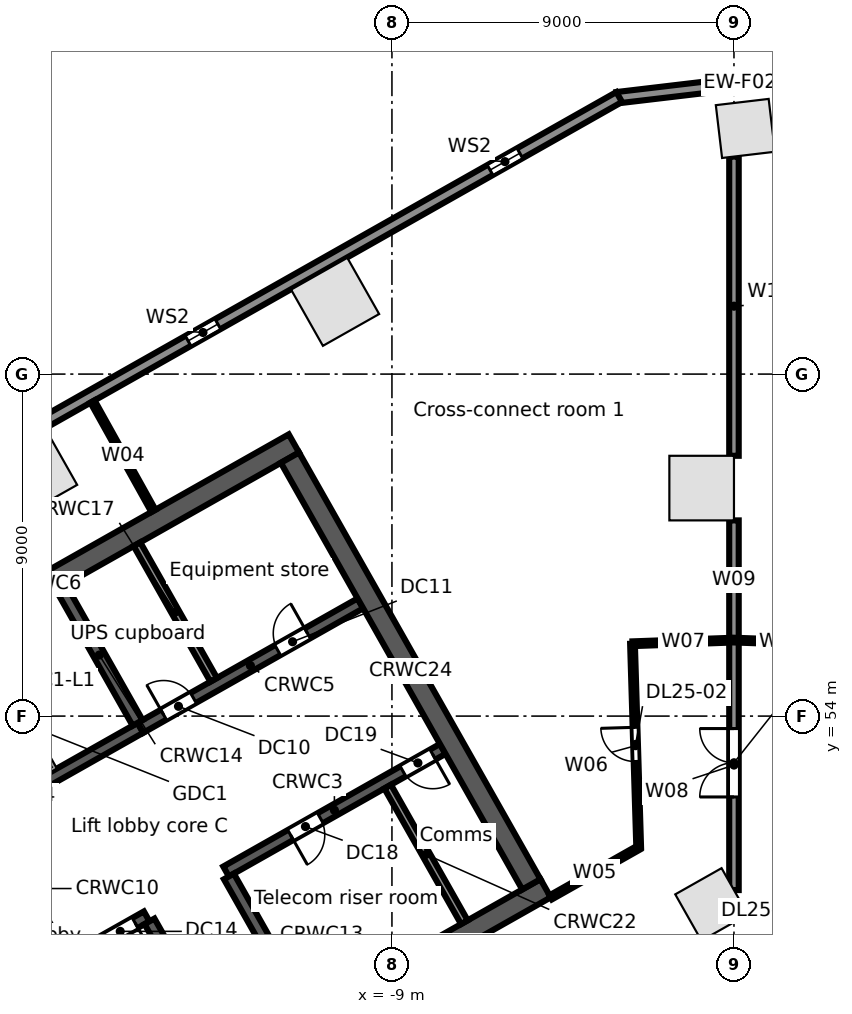
"""IFC4 building model, lengths in metres.
Left out: names, types, materials, properties, quantities, classifications, styles, units other than length and angle.
Written with IfcOpenShell. Run it as: python <this file> out.ifc"""

import sys

from ifc_helpers import new_model, si_unit, direction, frame, frame_2d, origin, origin_2d, place, context, subcontext, project, spatial, rectangle, extrude, element, fill, save


model = new_model("IFC4")
c1 = context("Model", 3, precision=1e-05, world=origin(), true_north=direction((0.0, 1.0)))
c2 = subcontext(c1, "Body", "Model", "MODEL_VIEW")
j1 = project(units=[si_unit("LENGTHUNIT", "METRE"), si_unit("PLANEANGLEUNIT", "RADIAN")], contexts=[c1])
p1 = place(None, origin())
s1 = spatial("IfcSite", under=j1, at=p1, CompositionType="ELEMENT")
p2 = place(p1, origin())
s2 = spatial("IfcBuilding", under=s1, at=p2, CompositionType="ELEMENT")
p3 = place(p2, frame((0.0, 0.0, 123.5)))
s3 = spatial("IfcBuildingStorey", under=s2, at=p3, CompositionType="ELEMENT", Elevation=123.5)
p4 = place(p3, frame((0.3, 69.464, 0.0), z_axis=(0.0, 0.0, 1.0), x_axis=(-0.993068456955, -0.117537397458, 0.0)))
e1 = element("IfcColumn", 1, at=p4, inside=s3, PredefinedType="COLUMN", context=c2, shape_type="SweptSolid", body=[
    extrude(rectangle(XDim=1.4, YDim=1.4, at=origin_2d()), origin(), (0.0, 0.0, 1.0), 4.4),
])
for number, where, z_axis, x_axis in (
    (2, (-10.495, 64.902, 0.0), (0.0, 0.0, 1.0), (-0.87, -0.492, 0.0)),
    (3, (-18.441, 60.406, 0.0), (0.0, 0.0, 1.0), (-0.87, -0.492, 0.0)),
):
    element("IfcColumn", number, at=place(p3, frame(where, z_axis=z_axis, x_axis=x_axis)), inside=s3, PredefinedType="COLUMN", context=c2, shape_type="SweptSolid", body=[
        extrude(rectangle(XDim=1.7, YDim=1.7, at=origin_2d()), origin(), (0.0, 0.0, 1.0), 4.4),
    ])
p5 = place(p3, frame((-0.591, 49.044, 0.0), z_axis=(0.0, 0.0, 1.0), x_axis=(0.87035569594, 0.492423560103, 0.0)))
e4 = element("IfcColumn", 4, at=p5, inside=s3, PredefinedType="COLUMN", context=c2, shape_type="SweptSolid", body=[
    extrude(rectangle(XDim=1.4, YDim=1.4, at=origin_2d()), origin(), (0.0, 0.0, 1.0), 4.4),
])
p6 = place(p3, frame((-0.85, 60.0, 0.0), z_axis=(0.0, 0.0, 1.0), x_axis=(0.0, 1.0, 0.0)))
e5 = element("IfcColumn", 5, at=p6, inside=s3, PredefinedType="COLUMN", context=c2, shape_type="SweptSolid", body=[
    extrude(rectangle(XDim=1.7, YDim=1.7, at=origin_2d()), origin(), (0.0, 0.0, 1.0), 4.4),
])
p7 = place(p3, frame((-3.076, 70.273, 0.0), z_axis=(0.0, 0.0, 1.0), x_axis=(0.993067743007, 0.117543429416, 0.0)))
e6 = element("IfcWall", 6, at=p7, inside=s3, PredefinedType="STANDARD", context=c2, shape_type="SweptSolid", body=[
    extrude(rectangle(XDim=6.516, YDim=0.3, at=frame_2d((3.258, 0.0))), origin(), (0.0, 0.0, 1.0), 4.08),
])
p8 = place(p3, frame((-58.745, 38.764, 0.0), z_axis=(0.0, 0.0, 1.0), x_axis=(0.870355811726, 0.492423355453, 0.0)))
e7 = element("IfcWall", 7, at=p8, inside=s3, PredefinedType="STANDARD", context=c2, shape_type="SweptSolid", body=[
    extrude(rectangle(XDim=64.025, YDim=0.3, at=frame_2d((32.013, 0.0))), origin(), (0.0, 0.0, 1.0), 4.08),
])
p9 = place(p8, frame((60.122, 0.0, 0.6)))
e8 = element("IfcOpeningElement", 8, at=p9, cuts=e7, PredefinedType="OPENING", context=c2, shape_type="SweptSolid", body=[
    extrude(rectangle(XDim=0.9, YDim=2.8, at=frame_2d((0.45, 1.4))), frame((0.0, 0.16, 0.0), z_axis=(0.0, -1.0, 0.0), x_axis=(1.0, 0.0, 0.0)), (0.0, 0.0, 1.0), 0.32),
])
p10 = place(p8, frame((50.992, 0.0, 0.6)))
e9 = element("IfcOpeningElement", 9, at=p10, cuts=e7, PredefinedType="OPENING", context=c2, shape_type="SweptSolid", body=[
    extrude(rectangle(XDim=0.9, YDim=2.8, at=frame_2d((0.45, 1.4))), frame((0.0, 0.16, 0.0), z_axis=(0.0, -1.0, 0.0), x_axis=(1.0, 0.0, 0.0)), (0.0, 0.0, 1.0), 0.32),
])
p11 = place(p8, frame((41.862, 0.0, 0.6)))
e10 = element("IfcOpeningElement", 10, at=p11, cuts=e7, PredefinedType="OPENING", context=c2, shape_type="SweptSolid", body=[
    extrude(rectangle(XDim=0.9, YDim=2.8, at=frame_2d((0.45, 1.4))), frame((0.0, 0.16, 0.0), z_axis=(0.0, -1.0, 0.0), x_axis=(1.0, 0.0, 0.0)), (0.0, 0.0, 1.0), 0.32),
])
p12 = place(p8, frame((32.732, 0.0, 0.6)))
e11 = element("IfcOpeningElement", 11, at=p12, cuts=e7, PredefinedType="OPENING", context=c2, shape_type="SweptSolid", body=[
    extrude(rectangle(XDim=0.9, YDim=2.8, at=frame_2d((0.45, 1.4))), frame((0.0, 0.16, 0.0), z_axis=(0.0, -1.0, 0.0), x_axis=(1.0, 0.0, 0.0)), (0.0, 0.0, 1.0), 0.32),
])
p13 = place(p8, frame((23.602, 0.0, 0.6)))
e12 = element("IfcOpeningElement", 12, at=p13, cuts=e7, PredefinedType="OPENING", context=c2, shape_type="SweptSolid", body=[
    extrude(rectangle(XDim=0.9, YDim=2.8, at=frame_2d((0.45, 1.4))), frame((0.0, 0.16, 0.0), z_axis=(0.0, -1.0, 0.0), x_axis=(1.0, 0.0, 0.0)), (0.0, 0.0, 1.0), 0.32),
])
p14 = place(p8, frame((14.472, 0.0, 0.6)))
e13 = element("IfcOpeningElement", 13, at=p14, cuts=e7, PredefinedType="OPENING", context=c2, shape_type="SweptSolid", body=[
    extrude(rectangle(XDim=0.9, YDim=2.8, at=frame_2d((0.45, 1.4))), frame((0.0, 0.16, 0.0), z_axis=(0.0, -1.0, 0.0), x_axis=(1.0, 0.0, 0.0)), (0.0, 0.0, 1.0), 0.32),
])
p15 = place(p8, frame((5.342, 0.0, 0.6)))
e14 = element("IfcOpeningElement", 14, at=p15, cuts=e7, PredefinedType="OPENING", context=c2, shape_type="SweptSolid", body=[
    extrude(rectangle(XDim=0.9, YDim=2.8, at=frame_2d((0.45, 1.4))), frame((0.0, 0.16, 0.0), z_axis=(0.0, -1.0, 0.0), x_axis=(1.0, 0.0, 0.0)), (0.0, 0.0, 1.0), 0.32),
])
p16 = place(p3, frame((-18.012, 42.083, 0.0), z_axis=(0.0, 0.0, 1.0), x_axis=(0.870360574057, 0.492414937962, 0.0)))
e15 = element("IfcWall", 15, at=p16, inside=s3, PredefinedType="SOLIDWALL", context=c2, shape_type="SweptSolid", body=[
    extrude(rectangle(XDim=15.0, YDim=0.55, at=frame_2d((7.5, 0.0))), origin(), (0.0, 0.0, 1.0), 4.08),
])
p17 = place(p16, frame((6.1, 0.0, 0.0)))
e16 = element("IfcOpeningElement", 16, at=p17, cuts=e15, PredefinedType="OPENING", context=c2, shape_type="SweptSolid", body=[
    extrude(rectangle(XDim=1.2, YDim=2.1, at=frame_2d((0.6, 1.05))), frame((0.0, 0.285, 0.0), z_axis=(0.0, -1.0, 0.0), x_axis=(1.0, 0.0, 0.0)), (0.0, 0.0, 1.0), 0.57),
])
p18 = place(p3, frame((-19.762, 46.292, 0.0), z_axis=(0.0, 0.0, 1.0), x_axis=(0.870359758983, 0.49241637863, 0.0)))
e17 = element("IfcWall", 17, at=p18, inside=s3, PredefinedType="SOLIDWALL", context=c2, shape_type="SweptSolid", body=[
    extrude(rectangle(XDim=4.95, YDim=0.3, at=frame_2d((2.475, 0.0))), origin(), (0.0, 0.0, 1.0), 4.08),
])
p19 = place(p18, frame((0.6, 0.0, 0.0)))
e18 = element("IfcOpeningElement", 18, at=p19, cuts=e17, PredefinedType="OPENING", context=c2, shape_type="SweptSolid", body=[
    extrude(rectangle(XDim=1.1, YDim=2.1, at=frame_2d((0.55, 1.05))), frame((0.0, 0.16, 0.0), z_axis=(0.0, -1.0, 0.0), x_axis=(1.0, 0.0, 0.0)), (0.0, 0.0, 1.0), 0.32),
])
p20 = place(p18, frame((3.7, 0.0, 0.0)))
e19 = element("IfcOpeningElement", 19, at=p20, cuts=e17, PredefinedType="OPENING", context=c2, shape_type="SweptSolid", body=[
    extrude(rectangle(XDim=0.9, YDim=2.1, at=frame_2d((0.45, 1.05))), frame((0.0, 0.16, 0.0), z_axis=(0.0, -1.0, 0.0), x_axis=(1.0, 0.0, 0.0)), (0.0, 0.0, 1.0), 0.32),
])
p21 = place(p3, frame((-13.365, 49.911, 0.0), z_axis=(0.0, 0.0, 1.0), x_axis=(0.870336435567, 0.492457601144, 0.0)))
e20 = element("IfcWall", 20, at=p21, inside=s3, PredefinedType="SOLIDWALL", context=c2, shape_type="SweptSolid", body=[
    extrude(rectangle(XDim=6.55, YDim=0.3, at=frame_2d((3.275, 0.0))), origin(), (0.0, 0.0, 1.0), 4.08),
])
p22 = place(p21, frame((1.95, 0.0, 0.0)))
e21 = element("IfcOpeningElement", 21, at=p22, cuts=e20, PredefinedType="OPENING", context=c2, shape_type="SweptSolid", body=[
    extrude(rectangle(XDim=0.9, YDim=2.1, at=frame_2d((0.45, 1.05))), frame((0.0, 0.16, 0.0), z_axis=(0.0, -1.0, 0.0), x_axis=(1.0, 0.0, 0.0)), (0.0, 0.0, 1.0), 0.32),
])
p23 = place(p21, frame((5.35, 0.0, 0.0)))
e22 = element("IfcOpeningElement", 22, at=p23, cuts=e20, PredefinedType="OPENING", context=c2, shape_type="SweptSolid", body=[
    extrude(rectangle(XDim=0.9, YDim=2.1, at=frame_2d((0.45, 1.05))), frame((0.0, 0.16, 0.0), z_axis=(0.0, -1.0, 0.0), x_axis=(1.0, 0.0, 0.0)), (0.0, 0.0, 1.0), 0.32),
])
p24 = place(p3, frame((-21.928, 50.121, 0.0), z_axis=(0.0, 0.0, 1.0), x_axis=(0.870340732628, 0.49245000673, 0.0)))
e23 = element("IfcWall", 23, at=p24, inside=s3, PredefinedType="SOLIDWALL", context=c2, shape_type="SweptSolid", body=[
    extrude(rectangle(XDim=7.25, YDim=0.3, at=frame_2d((3.625, 0.0))), origin(), (0.0, 0.0, 1.0), 4.08),
])
p25 = place(p24, frame((0.25, 0.0, 0.0)))
e24 = element("IfcOpeningElement", 24, at=p25, cuts=e23, PredefinedType="OPENING", context=c2, shape_type="SweptSolid", body=[
    extrude(rectangle(XDim=1.0, YDim=2.1, at=frame_2d((0.5, 1.05))), frame((0.0, 0.16, 0.0), z_axis=(0.0, -1.0, 0.0), x_axis=(1.0, 0.0, 0.0)), (0.0, 0.0, 1.0), 0.32),
])
p26 = place(p3, frame((-15.618, 53.691, 0.0), z_axis=(0.0, 0.0, 1.0), x_axis=(0.870367894134, 0.492401999246, 0.0)))
e25 = element("IfcWall", 25, at=p26, inside=s3, PredefinedType="SOLIDWALL", context=c2, shape_type="SweptSolid", body=[
    extrude(rectangle(XDim=6.65, YDim=0.3, at=frame_2d((3.325, 0.0))), origin(), (0.0, 0.0, 1.0), 4.08),
])
p27 = place(p26, frame((0.7, 0.0, 0.0)))
e26 = element("IfcOpeningElement", 26, at=p27, cuts=e25, PredefinedType="OPENING", context=c2, shape_type="SweptSolid", body=[
    extrude(rectangle(XDim=0.9, YDim=2.1, at=frame_2d((0.45, 1.05))), frame((0.0, 0.16, 0.0), z_axis=(0.0, -1.0, 0.0), x_axis=(1.0, 0.0, 0.0)), (0.0, 0.0, 1.0), 0.32),
])
p28 = place(p26, frame((4.15, 0.0, 0.0)))
e27 = element("IfcOpeningElement", 27, at=p28, cuts=e25, PredefinedType="OPENING", context=c2, shape_type="SweptSolid", body=[
    extrude(rectangle(XDim=0.9, YDim=2.1, at=frame_2d((0.45, 1.05))), frame((0.0, 0.16, 0.0), z_axis=(0.0, -1.0, 0.0), x_axis=(1.0, 0.0, 0.0)), (0.0, 0.0, 1.0), 0.32),
])
p29 = place(p3, frame((-24.635, 53.789, 0.0), z_axis=(0.0, 0.0, 1.0), x_axis=(0.870360574057, 0.492414937962, 0.0)))
e28 = element("IfcWall", 28, at=p29, inside=s3, PredefinedType="SOLIDWALL", context=c2, shape_type="SweptSolid", body=[
    extrude(rectangle(XDim=15.0, YDim=0.55, at=frame_2d((7.5, 0.0))), origin(), (0.0, 0.0, 1.0), 4.08),
])
p30 = place(p3, frame((-24.26, 53.685, 0.0), z_axis=(0.0, 0.0, 1.0), x_axis=(0.492427022044, -0.870353737259, 0.0)))
e29 = element("IfcWall", 29, at=p30, inside=s3, PredefinedType="SOLIDWALL", context=c2, shape_type="SweptSolid", body=[
    extrude(rectangle(XDim=12.9, YDim=0.55, at=frame_2d((6.45, 0.0))), origin(), (0.0, 0.0, 1.0), 4.08),
])
p31 = place(p3, frame((-19.635, 51.246, 0.0), z_axis=(0.0, 0.0, 1.0), x_axis=(0.492408451753, -0.87036424366, 0.0)))
e30 = element("IfcWall", 30, at=p31, inside=s3, PredefinedType="PARTITIONING", context=c2, shape_type="SweptSolid", body=[
    extrude(rectangle(XDim=4.1, YDim=0.2, at=frame_2d((2.05, 0.0))), origin(), (0.0, 0.0, 1.0), 4.08),
])
p32 = place(p31, frame((1.55, 0.0, 0.0)))
e31 = element("IfcOpeningElement", 31, at=p32, cuts=e30, PredefinedType="OPENING", context=c2, shape_type="SweptSolid", body=[
    extrude(rectangle(XDim=1.0, YDim=2.1, at=frame_2d((0.5, 1.05))), frame((0.0, 0.11, 0.0), z_axis=(0.0, -1.0, 0.0), x_axis=(1.0, 0.0, 0.0)), (0.0, 0.0, 1.0), 0.22),
])
for number, where, z_axis, x_axis in (
    (32, (-15.379, 48.599, 0.0), (0.0, 0.0, 1.0), (0.492, -0.87, 0.0)),
    (33, (-17.711, 57.39, 0.0), (0.0, 0.0, 1.0), (0.492, -0.87, 0.0)),
):
    element("IfcWall", number, at=place(p3, frame(where, z_axis=z_axis, x_axis=x_axis)), inside=s3, PredefinedType="SOLIDWALL", context=c2, shape_type="SweptSolid", body=[
        extrude(rectangle(XDim=4.1, YDim=0.3, at=frame_2d((2.05, 0.0))), origin(), (0.0, 0.0, 1.0), 4.08),
    ])
p33 = place(p3, frame((-13.291, 49.781, 0.0), z_axis=(0.0, 0.0, 1.0), x_axis=(0.492382931784, -0.870378681085, 0.0)))
e34 = element("IfcWall", 34, at=p33, inside=s3, PredefinedType="SOLIDWALL", context=c2, shape_type="SweptSolid", body=[
    extrude(rectangle(XDim=4.1, YDim=0.3, at=frame_2d((2.05, 0.0))), origin(), (0.0, 0.0, 1.0), 4.08),
])
p34 = place(p3, frame((-15.709, 58.523, 0.0), z_axis=(0.0, 0.0, 1.0), x_axis=(0.492428039142, -0.870353161807, 0.0)))
e35 = element("IfcWall", 35, at=p34, inside=s3, PredefinedType="PARTITIONING", context=c2, shape_type="SweptSolid", body=[
    extrude(rectangle(XDim=4.1, YDim=0.2, at=frame_2d((2.05, 0.0))), origin(), (0.0, 0.0, 1.0), 4.08),
])
p35 = place(p3, frame((-9.113, 52.144, 0.0), z_axis=(0.0, 0.0, 1.0), x_axis=(0.492408451753, -0.87036424366, 0.0)))
e36 = element("IfcWall", 36, at=p35, inside=s3, PredefinedType="PARTITIONING", context=c2, shape_type="SweptSolid", body=[
    extrude(rectangle(XDim=4.1, YDim=0.2, at=frame_2d((2.05, 0.0))), origin(), (0.0, 0.0, 1.0), 4.08),
])
p36 = place(p3, frame((-11.684, 60.8, 0.0), z_axis=(0.0, 0.0, 1.0), x_axis=(0.492427022044, -0.870353737259, 0.0)))
e37 = element("IfcWall", 37, at=p36, inside=s3, PredefinedType="SOLIDWALL", context=c2, shape_type="SweptSolid", body=[
    extrude(rectangle(XDim=12.9, YDim=0.55, at=frame_2d((6.45, 0.0))), origin(), (0.0, 0.0, 1.0), 4.08),
])
p37 = place(p3, frame((-16.879, 62.278, 0.0), z_axis=(0.0, 0.0, 1.0), x_axis=(0.486580163018, -0.873635933875, 0.0)))
e38 = element("IfcWall", 38, at=p37, inside=s3, PredefinedType="PARTITIONING", context=c2, shape_type="SweptSolid", body=[
    extrude(rectangle(XDim=3.294, YDim=0.125, at=frame_2d((1.647, 0.0))), origin(), (0.0, 0.0, 1.0), 3.36),
])
p38 = place(p3, frame((-4.821, 49.23, 0.0), z_axis=(0.0, 0.0, 1.0), x_axis=(0.870371217631, 0.492396124598, 0.0)))
e39 = element("IfcWall", 39, at=p38, inside=s3, PredefinedType="PARTITIONING", context=c2, shape_type="SweptSolid", body=[
    extrude(rectangle(XDim=2.659, YDim=0.125, at=frame_2d((1.329, 0.0))), origin(), (0.0, 0.0, 1.0), 4.08),
])
p39 = place(p3, frame((-2.67, 55.904, 0.0), z_axis=(0.0, 0.0, 1.0), x_axis=(0.030338701418, -0.999539675649, 0.0)))
e40 = element("IfcWall", 40, at=p39, inside=s3, PredefinedType="PARTITIONING", context=c2, shape_type="SweptSolid", body=[
    extrude(rectangle(XDim=5.367, YDim=0.125, at=frame_2d((2.684, 0.0))), origin(), (0.0, 0.0, 1.0), 4.08),
])
p40 = place(p39, frame((2.2, 0.0, 0.0)))
e41 = element("IfcOpeningElement", 41, at=p40, cuts=e40, PredefinedType="OPENING", context=c2, shape_type="SweptSolid", body=[
    extrude(rectangle(XDim=0.9, YDim=2.1, at=frame_2d((0.45, 1.05))), frame((0.0, 0.073, 0.0), z_axis=(0.0, -1.0, 0.0), x_axis=(1.0, 0.0, 0.0)), (0.0, 0.0, 1.0), 0.145),
])
p41 = place(p3, frame((-2.67, 55.904, 0.0), z_axis=(0.0, 0.0, 1.0), x_axis=(0.999354913865, 0.03591317494, 0.0)))
e42 = element("IfcWall", 42, at=p41, inside=s3, PredefinedType="PARTITIONING", context=c2, shape_type="SweptSolid", body=[
    extrude(rectangle(XDim=2.672, YDim=0.125, at=frame_2d((1.336, 0.0))), origin(), (0.0, 0.0, 1.0), 3.142),
])
p42 = place(p3, frame((0.0, 49.422, 0.0), z_axis=(0.0, 0.0, 1.0), x_axis=(0.0, 1.0, 0.0)))
e43 = element("IfcWall", 43, at=p42, inside=s3, PredefinedType="PARTITIONING", context=c2, shape_type="SweptSolid", body=[
    extrude(rectangle(XDim=6.578, YDim=0.25, at=frame_2d((3.289, 0.0))), origin(), (0.0, 0.0, 1.0), 4.08),
])
p43 = place(p42, frame((2.45, 0.0, 0.0)))
e44 = element("IfcOpeningElement", 44, at=p43, cuts=e43, PredefinedType="OPENING", context=c2, shape_type="SweptSolid", body=[
    extrude(rectangle(XDim=1.8, YDim=2.1, at=frame_2d((0.9, 1.05))), frame((0.0, 0.135, 0.0), z_axis=(0.0, -1.0, 0.0), x_axis=(1.0, 0.0, 0.0)), (0.0, 0.0, 1.0), 0.27),
])
p44 = place(p3, frame((0.0, 56.0, 0.0), z_axis=(0.0, 0.0, 1.0), x_axis=(0.0, 1.0, 0.0)))
e45 = element("IfcWall", 45, at=p44, inside=s3, PredefinedType="PARTITIONING", context=c2, shape_type="SweptSolid", body=[
    extrude(rectangle(XDim=3.15, YDim=0.25, at=frame_2d((1.575, 0.0))), origin(), (0.0, 0.0, 1.0), 4.08),
])
p45 = place(p3, frame((0.0, 56.0, 0.0), z_axis=(0.0, 0.0, 1.0), x_axis=(0.999349313684, -0.036068673934, 0.0)))
e46 = element("IfcWall", 46, at=p45, inside=s3, PredefinedType="PARTITIONING", context=c2, shape_type="SweptSolid", body=[
    extrude(rectangle(XDim=2.471, YDim=0.125, at=frame_2d((1.235, 0.0))), origin(), (0.0, 0.0, 1.0), 4.08),
])
p46 = place(p3, frame((0.0, 60.85, 0.0), z_axis=(0.0, 0.0, 1.0), x_axis=(0.0, 1.0, 0.0)))
e47 = element("IfcWall", 47, at=p46, inside=s3, PredefinedType="PARTITIONING", context=c2, shape_type="SweptSolid", body=[
    extrude(rectangle(XDim=7.874, YDim=0.25, at=frame_2d((3.937, 0.0))), origin(), (0.0, 0.0, 1.0), 3.352),
])
p47 = place(p9, origin())
e48 = element("IfcWindow", 48, at=p47, inside=s3, PartitioningType="SINGLE_PANEL", PredefinedType="WINDOW", context=c2, shape_type="SweptSolid", body=[
    extrude(rectangle(XDim=0.9, YDim=2.8, at=frame_2d((0.45, 1.4))), frame((0.0, 0.03, 0.0), z_axis=(0.0, -1.0, 0.0), x_axis=(1.0, 0.0, 0.0)), (0.0, 0.0, 1.0), 0.06),
])
fill(e8, e48)
p48 = place(p10, origin())
e49 = element("IfcWindow", 49, at=p48, inside=s3, PartitioningType="SINGLE_PANEL", PredefinedType="WINDOW", context=c2, shape_type="SweptSolid", body=[
    extrude(rectangle(XDim=0.9, YDim=2.8, at=frame_2d((0.45, 1.4))), frame((0.0, 0.03, 0.0), z_axis=(0.0, -1.0, 0.0), x_axis=(1.0, 0.0, 0.0)), (0.0, 0.0, 1.0), 0.06),
])
fill(e9, e49)
p49 = place(p27, origin())
e50 = element("IfcDoor", 50, at=p49, inside=s3, OperationType="SINGLE_SWING_LEFT", PredefinedType="DOOR", context=c2, shape_type="SweptSolid", body=[
    extrude(rectangle(XDim=0.9, YDim=2.1, at=frame_2d((0.45, 1.05))), frame((0.0, 0.025, 0.0), z_axis=(0.0, -1.0, 0.0), x_axis=(1.0, 0.0, 0.0)), (0.0, 0.0, 1.0), 0.05),
])
fill(e26, e50)
p50 = place(p28, origin())
e51 = element("IfcDoor", 51, at=p50, inside=s3, OperationType="SINGLE_SWING_RIGHT", PredefinedType="DOOR", context=c2, shape_type="SweptSolid", body=[
    extrude(rectangle(XDim=0.9, YDim=2.1, at=frame_2d((0.45, 1.05))), frame((0.0, 0.025, 0.0), z_axis=(0.0, -1.0, 0.0), x_axis=(1.0, 0.0, 0.0)), (0.0, 0.0, 1.0), 0.05),
])
fill(e27, e51)
p51 = place(p20, frame((0.9, 0.0, 0.0), z_axis=(0.0, 0.0, 1.0), x_axis=(-1.0, 0.0, 0.0)))
e52 = element("IfcDoor", 52, at=p51, inside=s3, OperationType="SINGLE_SWING_LEFT", PredefinedType="DOOR", context=c2, shape_type="SweptSolid", body=[
    extrude(rectangle(XDim=0.9, YDim=2.1, at=frame_2d((0.45, 1.05))), frame((0.0, 0.025, 0.0), z_axis=(0.0, -1.0, 0.0), x_axis=(1.0, 0.0, 0.0)), (0.0, 0.0, 1.0), 0.05),
])
fill(e19, e52)
p52 = place(p22, frame((0.9, 0.0, 0.0), z_axis=(0.0, 0.0, 1.0), x_axis=(-1.0, 0.0, 0.0)))
e53 = element("IfcDoor", 53, at=p52, inside=s3, OperationType="SINGLE_SWING_RIGHT", PredefinedType="DOOR", context=c2, shape_type="SweptSolid", body=[
    extrude(rectangle(XDim=0.9, YDim=2.1, at=frame_2d((0.45, 1.05))), frame((0.0, 0.025, 0.0), z_axis=(0.0, -1.0, 0.0), x_axis=(1.0, 0.0, 0.0)), (0.0, 0.0, 1.0), 0.05),
])
fill(e21, e53)
p53 = place(p23, frame((0.9, 0.0, 0.0), z_axis=(0.0, 0.0, 1.0), x_axis=(-1.0, 0.0, 0.0)))
e54 = element("IfcDoor", 54, at=p53, inside=s3, OperationType="SINGLE_SWING_LEFT", PredefinedType="DOOR", context=c2, shape_type="SweptSolid", body=[
    extrude(rectangle(XDim=0.9, YDim=2.1, at=frame_2d((0.45, 1.05))), frame((0.0, 0.025, 0.0), z_axis=(0.0, -1.0, 0.0), x_axis=(1.0, 0.0, 0.0)), (0.0, 0.0, 1.0), 0.05),
])
fill(e22, e54)
p54 = place(p40, frame((0.9, 0.0, 0.0), z_axis=(0.0, 0.0, 1.0), x_axis=(-1.0, 0.0, 0.0)))
e55 = element("IfcDoor", 55, at=p54, inside=s3, OperationType="SINGLE_SWING_RIGHT", PredefinedType="DOOR", context=c2, shape_type="SweptSolid", body=[
    extrude(rectangle(XDim=0.9, YDim=2.1, at=frame_2d((0.45, 1.05))), frame((0.0, 0.025, 0.0), z_axis=(0.0, -1.0, 0.0), x_axis=(1.0, 0.0, 0.0)), (0.0, 0.0, 1.0), 0.05),
])
fill(e41, e55)
p55 = place(p43, origin())
e56 = element("IfcDoor", 56, at=p55, inside=s3, OperationType="DOUBLE_DOOR_SINGLE_SWING", PredefinedType="DOOR", context=c2, shape_type="SweptSolid", body=[
    extrude(rectangle(XDim=1.8, YDim=2.1, at=frame_2d((0.9, 1.05))), frame((0.0, 0.025, 0.0), z_axis=(0.0, -1.0, 0.0), x_axis=(1.0, 0.0, 0.0)), (0.0, 0.0, 1.0), 0.05),
])
fill(e44, e56)
save(model, sys.argv[1])
